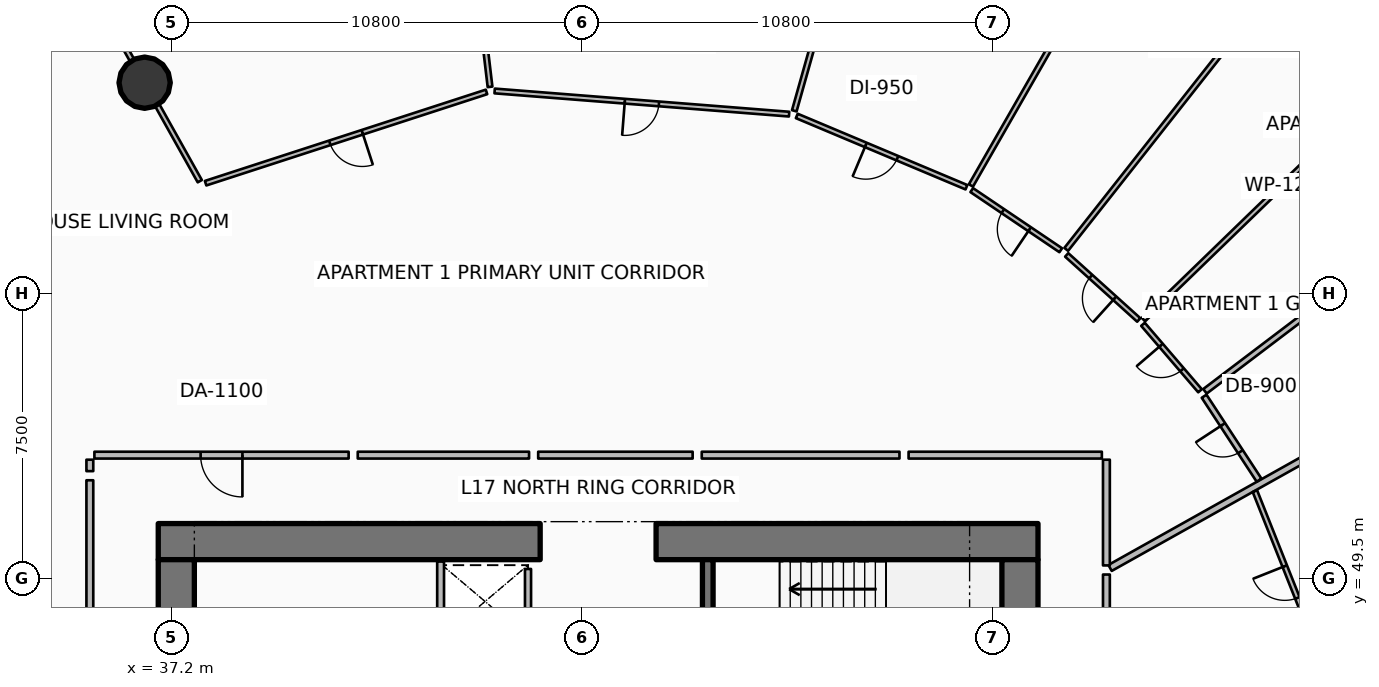
"""IFC4 building model, lengths in metres.
Left out: names, types, materials, properties, quantities, classifications, styles, units other than length and angle.
Written with IfcOpenShell. Run it as: python <this file> out.ifc"""

import sys

from ifc_helpers import new_model, si_unit, direction, frame, frame_2d, origin, origin_2d, place, context, subcontext, project, spatial, rectangle, circle, extrude, element, fill, save


model = new_model("IFC4")
c1 = context("Model", 3, precision=1e-05, world=origin(), true_north=direction((0.0, 1.0)))
c2 = subcontext(c1, "Body", "Model", "MODEL_VIEW")
j1 = project(units=[si_unit("LENGTHUNIT", "METRE"), si_unit("PLANEANGLEUNIT", "RADIAN")], contexts=[c1])
p1 = place(None, origin())
s1 = spatial("IfcSite", under=j1, at=p1, CompositionType="ELEMENT")
p2 = place(p1, origin())
s2 = spatial("IfcBuilding", under=s1, at=p2, CompositionType="ELEMENT")
p3 = place(p2, frame((0.0, 0.0, 71.4)))
s3 = spatial("IfcBuildingStorey", under=s2, at=p3, CompositionType="ELEMENT", Elevation=71.4)
p4 = place(p3, frame((36.85, 50.475, 0.0), z_axis=(0.0, 0.0, 1.0), x_axis=(1.0, 0.0, 0.0)))
e1 = element("IfcWall", 1, at=p4, inside=s3, PredefinedType="SHEAR", context=c2, shape_type="SweptSolid", body=[
    extrude(rectangle(XDim=10.05, YDim=0.95, at=frame_2d((5.025, 0.0))), origin(), (0.0, 0.0, 1.0), 3.75),
])
p5 = place(p3, frame((49.95, 50.475, 0.0), z_axis=(0.0, 0.0, 1.0), x_axis=(1.0, 0.0, 0.0)))
e2 = element("IfcWall", 2, at=p5, inside=s3, PredefinedType="SHEAR", context=c2, shape_type="SweptSolid", body=[
    extrude(rectangle(XDim=10.05, YDim=0.95, at=frame_2d((5.025, 0.0))), origin(), (0.0, 0.0, 1.0), 3.75),
])
for number, where, z_axis, x_axis in (
    (3, (37.325, 34.0, 0.0), (0.0, 0.0, 1.0), (0.0, 1.0, 0.0)),
    (4, (59.525, 34.0, 0.0), (0.0, 0.0, 1.0), (0.0, 1.0, 0.0)),
):
    element("IfcWall", number, at=place(p3, frame(where, z_axis=z_axis, x_axis=x_axis)), inside=s3, PredefinedType="SHEAR", context=c2, shape_type="SweptSolid", body=[
        extrude(rectangle(XDim=16.0, YDim=0.95, at=frame_2d((8.0, 0.0))), origin(), (0.0, 0.0, 1.0), 3.75),
    ])
p6 = place(p3, frame((51.31, 46.5, 0.0), z_axis=(0.0, 0.0, 1.0), x_axis=(0.0, 1.0, 0.0)))
e5 = element("IfcWall", 5, at=p6, inside=s3, PredefinedType="SHEAR", context=c2, shape_type="SweptSolid", body=[
    extrude(rectangle(XDim=3.5, YDim=0.28, at=frame_2d((1.75, 0.0))), origin(), (0.0, 0.0, 1.0), 3.75),
])
p7 = place(p3, frame((65.458, 64.146, 0.0), z_axis=(-0.271840819549, -0.344907860641, 0.898410338595), x_axis=(0.785386244622, -0.619006015123, 0.0)))
e6 = element("IfcColumn", 6, at=p7, inside=s3, PredefinedType="COLUMN", context=c2, shape_type="SweptSolid", body=[
    extrude(circle(Radius=0.675, at=origin_2d()), origin(), (0.0, 0.0, 1.0), 3.729),
])
p8 = place(p3, frame((36.492, 62.55, 0.0), z_axis=(0.184668222307, -0.329730947174, 0.925837539823), x_axis=(0.872484704386, 0.488641423349, 0.0)))
e7 = element("IfcColumn", 7, at=p8, inside=s3, PredefinedType="COLUMN", context=c2, shape_type="SweptSolid", body=[
    extrude(circle(Radius=0.675, at=origin_2d()), origin(), (0.0, 0.0, 1.0), 3.618),
])
p9 = place(p3, frame((46.58, 48.045, 0.0), z_axis=(0.0, 0.0, 1.0), x_axis=(0.0, 1.0, 0.0)))
e8 = element("IfcWall", 8, at=p9, inside=s3, PredefinedType="PARTITIONING", context=c2, shape_type="SweptSolid", body=[
    extrude(rectangle(XDim=1.71, YDim=0.16, at=frame_2d((0.855, 0.0))), origin(), (0.0, 0.0, 1.0), 3.35),
])
p10 = place(p3, frame((44.28, 47.82, 0.0), z_axis=(0.0, 0.0, 1.0), x_axis=(0.0, 1.0, 0.0)))
e9 = element("IfcWall", 9, at=p10, inside=s3, PredefinedType="PARTITIONING", context=c2, shape_type="SweptSolid", body=[
    extrude(rectangle(XDim=2.13, YDim=0.18, at=frame_2d((1.065, 0.0))), origin(), (0.0, 0.0, 1.0), 3.35),
])
p11 = place(p3, frame((61.896, 49.782, 0.0), z_axis=(0.0, 0.0, 1.0), x_axis=(0.872493215695, 0.488626225828, 0.0)))
e10 = element("IfcWall", 10, at=p11, inside=s3, PredefinedType="PARTITIONING", context=c2, shape_type="SweptSolid", body=[
    extrude(rectangle(XDim=15.612, YDim=0.18, at=frame_2d((7.806, 0.0))), origin(), (0.0, 0.0, 1.0), 2.307),
])
p12 = place(p3, frame((41.86, 52.75, 0.0), z_axis=(0.0, 0.0, 1.0), x_axis=(-1.0, 0.0, 0.0)))
e11 = element("IfcWall", 11, at=p12, inside=s3, PredefinedType="PARTITIONING", context=c2, shape_type="SweptSolid", body=[
    extrude(rectangle(XDim=6.69, YDim=0.18, at=frame_2d((3.345, 0.0))), origin(), (0.0, 0.0, 1.0), 2.307),
])
p13 = place(p12, frame((2.795, 0.0, 0.0)))
e12 = element("IfcOpeningElement", 12, at=p13, cuts=e11, PredefinedType="OPENING", context=c2, shape_type="SweptSolid", body=[
    extrude(rectangle(XDim=1.1, YDim=2.1, at=frame_2d((0.55, 1.05))), frame((0.0, 0.1, 0.0), z_axis=(0.0, -1.0, 0.0), x_axis=(1.0, 0.0, 0.0)), (0.0, 0.0, 1.0), 0.2),
])
p14 = place(p3, frame((35.05, 52.63, 0.0), z_axis=(0.0, 0.0, 1.0), x_axis=(0.0, -1.0, 0.0)))
e13 = element("IfcWall", 13, at=p14, inside=s3, PredefinedType="PARTITIONING", context=c2, shape_type="SweptSolid", body=[
    extrude(rectangle(XDim=0.301, YDim=0.18, at=frame_2d((0.15, 0.0))), origin(), (0.0, 0.0, 1.0), 2.307),
])
p15 = place(p3, frame((61.8, 49.848, 0.0), z_axis=(0.0, 0.0, 1.0), x_axis=(0.0, 1.0, 0.0)))
e14 = element("IfcWall", 14, at=p15, inside=s3, PredefinedType="PARTITIONING", context=c2, shape_type="SweptSolid", body=[
    extrude(rectangle(XDim=2.781, YDim=0.18, at=frame_2d((1.391, 0.0))), origin(), (0.0, 0.0, 1.0), 2.307),
])
p16 = place(p3, frame((61.68, 52.75, 0.0), z_axis=(0.0, 0.0, 1.0), x_axis=(-1.0, 0.0, 0.0)))
e15 = element("IfcWall", 15, at=p16, inside=s3, PredefinedType="PARTITIONING", context=c2, shape_type="SweptSolid", body=[
    extrude(rectangle(XDim=5.085, YDim=0.18, at=frame_2d((2.543, 0.0))), origin(), (0.0, 0.0, 1.0), 2.307),
])
p17 = place(p3, frame((65.816, 52.092, 0.0), z_axis=(0.0, 0.0, 1.0), x_axis=(-0.547635625156, 0.836716930664, 0.0)))
e16 = element("IfcWall", 16, at=p17, inside=s3, PredefinedType="PARTITIONING", context=c2, shape_type="SweptSolid", body=[
    extrude(rectangle(XDim=2.639, YDim=0.15, at=frame_2d((1.32, 0.0))), origin(), (0.0, 0.0, 1.0), 2.307),
])
p18 = place(p17, frame((0.895, 0.0, 0.0)))
e17 = element("IfcOpeningElement", 17, at=p18, cuts=e16, PredefinedType="OPENING", context=c2, shape_type="SweptSolid", body=[
    extrude(rectangle(XDim=0.85, YDim=2.06, at=frame_2d((0.425, 1.03))), frame((0.0, 0.085, 0.0), z_axis=(0.0, -1.0, 0.0), x_axis=(1.0, 0.0, 0.0)), (0.0, 0.0, 1.0), 0.17),
])
p19 = place(p3, frame((64.394, 54.43, 0.0), z_axis=(0.0, 0.0, 1.0), x_axis=(0.796855751732, 0.604169604442, 0.0)))
e18 = element("IfcWall", 18, at=p19, inside=s3, PredefinedType="PARTITIONING", context=c2, shape_type="SweptSolid", body=[
    extrude(rectangle(XDim=4.46, YDim=0.15, at=frame_2d((2.23, 0.0))), origin(), (0.0, 0.0, 1.0), 2.79),
])
p20 = place(p3, frame((62.775, 56.316, 0.0), z_axis=(0.0, 0.0, 1.0), x_axis=(0.718182919159, 0.695854363088, 0.0)))
e19 = element("IfcWall", 19, at=p20, inside=s3, PredefinedType="PARTITIONING", context=c2, shape_type="SweptSolid", body=[
    extrude(rectangle(XDim=10.114, YDim=0.125, at=frame_2d((5.057, 0.0))), origin(), (0.0, 0.0, 1.0), 2.325),
])
p21 = place(p3, frame((64.263, 54.444, 0.0), z_axis=(0.0, 0.0, 1.0), x_axis=(-0.651227570151, 0.758882502022, 0.0)))
e20 = element("IfcWall", 20, at=p21, inside=s3, PredefinedType="PARTITIONING", context=c2, shape_type="SweptSolid", body=[
    extrude(rectangle(XDim=2.304, YDim=0.125, at=frame_2d((1.152, 0.0))), origin(), (0.0, 0.0, 1.0), 2.79),
])
p22 = place(p21, frame((0.727, 0.0, 0.0)))
e21 = element("IfcOpeningElement", 21, at=p22, cuts=e20, PredefinedType="OPENING", context=c2, shape_type="SweptSolid", body=[
    extrude(rectangle(XDim=0.85, YDim=2.06, at=frame_2d((0.425, 1.03))), frame((0.0, 0.073, 0.0), z_axis=(0.0, -1.0, 0.0), x_axis=(1.0, 0.0, 0.0)), (0.0, 0.0, 1.0), 0.145),
])
p23 = place(p3, frame((62.651, 56.307, 0.0), z_axis=(0.0, 0.0, 1.0), x_axis=(-0.742266720662, 0.670104555571, 0.0)))
e22 = element("IfcWall", 22, at=p23, inside=s3, PredefinedType="PARTITIONING", context=c2, shape_type="SweptSolid", body=[
    extrude(rectangle(XDim=2.554, YDim=0.125, at=frame_2d((1.277, 0.0))), origin(), (0.0, 0.0, 1.0), 2.307),
])
p24 = place(p23, frame((0.852, 0.0, 0.0)))
e23 = element("IfcOpeningElement", 23, at=p24, cuts=e22, PredefinedType="OPENING", context=c2, shape_type="SweptSolid", body=[
    extrude(rectangle(XDim=0.85, YDim=2.06, at=frame_2d((0.425, 1.03))), frame((0.0, 0.073, 0.0), z_axis=(0.0, -1.0, 0.0), x_axis=(1.0, 0.0, 0.0)), (0.0, 0.0, 1.0), 0.145),
])
p25 = place(p3, frame((56.354, 52.75, 0.0), z_axis=(0.0, 0.0, 1.0), x_axis=(-1.0, 0.0, 0.0)))
e24 = element("IfcWall", 24, at=p25, inside=s3, PredefinedType="PARTITIONING", context=c2, shape_type="SweptSolid", body=[
    extrude(rectangle(XDim=5.203, YDim=0.18, at=frame_2d((2.601, 0.0))), origin(), (0.0, 0.0, 1.0), 2.307),
])
p26 = place(p3, frame((60.743, 58.164, 0.0), z_axis=(0.0, 0.0, 1.0), x_axis=(0.61907620874, 0.785330916093, 0.0)))
e25 = element("IfcWall", 25, at=p26, inside=s3, PredefinedType="PARTITIONING", context=c2, shape_type="SweptSolid", body=[
    extrude(rectangle(XDim=10.091, YDim=0.125, at=frame_2d((5.046, 0.0))), origin(), (0.0, 0.0, 1.0), 2.307),
])
p27 = place(p3, frame((58.235, 59.846, 0.0), z_axis=(0.0, 0.0, 1.0), x_axis=(0.497506673172, 0.867460149027, 0.0)))
e26 = element("IfcWall", 26, at=p27, inside=s3, PredefinedType="PARTITIONING", context=c2, shape_type="SweptSolid", body=[
    extrude(rectangle(XDim=8.435, YDim=0.125, at=frame_2d((4.218, 0.0))), origin(), (0.0, 0.0, 1.0), 2.325),
])
p28 = place(p3, frame((60.598, 58.142, 0.0), z_axis=(0.0, 0.0, 1.0), x_axis=(-0.828618216794, 0.559814121648, 0.0)))
e27 = element("IfcWall", 27, at=p28, inside=s3, PredefinedType="PARTITIONING", context=c2, shape_type="SweptSolid", body=[
    extrude(rectangle(XDim=2.825, YDim=0.125, at=frame_2d((1.413, 0.0))), origin(), (0.0, 0.0, 1.0), 2.307),
])
p29 = place(p28, frame((0.988, 0.0, 0.0)))
e28 = element("IfcOpeningElement", 28, at=p29, cuts=e27, PredefinedType="OPENING", context=c2, shape_type="SweptSolid", body=[
    extrude(rectangle(XDim=0.85, YDim=2.06, at=frame_2d((0.425, 1.03))), frame((0.0, 0.073, 0.0), z_axis=(0.0, -1.0, 0.0), x_axis=(1.0, 0.0, 0.0)), (0.0, 0.0, 1.0), 0.145),
])
p30 = place(p3, frame((58.117, 59.799, 0.0), z_axis=(0.0, 0.0, 1.0), x_axis=(-0.921919817634, 0.387380755657, 0.0)))
e29 = element("IfcWall", 29, at=p30, inside=s3, PredefinedType="PARTITIONING", context=c2, shape_type="SweptSolid", body=[
    extrude(rectangle(XDim=4.843, YDim=0.125, at=frame_2d((2.421, 0.0))), origin(), (0.0, 0.0, 1.0), 2.307),
])
p31 = place(p30, frame((1.971, 0.0, 0.0)))
e30 = element("IfcOpeningElement", 30, at=p31, cuts=e29, PredefinedType="OPENING", context=c2, shape_type="SweptSolid", body=[
    extrude(rectangle(XDim=0.9, YDim=2.08, at=frame_2d((0.45, 1.04))), frame((0.0, 0.073, 0.0), z_axis=(0.0, -1.0, 0.0), x_axis=(1.0, 0.0, 0.0)), (0.0, 0.0, 1.0), 0.145),
])
p32 = place(p3, frame((50.912, 52.75, 0.0), z_axis=(0.0, 0.0, 1.0), x_axis=(-1.0, 0.0, 0.0)))
e31 = element("IfcWall", 31, at=p32, inside=s3, PredefinedType="PARTITIONING", context=c2, shape_type="SweptSolid", body=[
    extrude(rectangle(XDim=4.064, YDim=0.18, at=frame_2d((2.032, 0.0))), origin(), (0.0, 0.0, 1.0), 2.307),
])
p33 = place(p3, frame((53.587, 61.81, 0.0), z_axis=(0.0, 0.0, 1.0), x_axis=(0.271464088879, 0.962448569249, 0.0)))
e32 = element("IfcWall", 32, at=p33, inside=s3, PredefinedType="PARTITIONING", context=c2, shape_type="SweptSolid", body=[
    extrude(rectangle(XDim=7.389, YDim=0.125, at=frame_2d((3.695, 0.0))), origin(), (0.0, 0.0, 1.0), 2.307),
])
p34 = place(p3, frame((53.45, 61.723, 0.0), z_axis=(0.0, 0.0, 1.0), x_axis=(-0.996916540968, 0.078469168116, 0.0)))
e33 = element("IfcWall", 33, at=p34, inside=s3, PredefinedType="PARTITIONING", context=c2, shape_type="SweptSolid", body=[
    extrude(rectangle(XDim=7.772, YDim=0.125, at=frame_2d((3.886, 0.0))), origin(), (0.0, 0.0, 1.0), 2.307),
])
p35 = place(p34, frame((3.436, 0.0, 0.0)))
e34 = element("IfcOpeningElement", 34, at=p35, cuts=e33, PredefinedType="OPENING", context=c2, shape_type="SweptSolid", body=[
    extrude(rectangle(XDim=0.9, YDim=2.08, at=frame_2d((0.45, 1.04))), frame((0.0, 0.073, 0.0), z_axis=(0.0, -1.0, 0.0), x_axis=(1.0, 0.0, 0.0)), (0.0, 0.0, 1.0), 0.145),
])
p36 = place(p3, frame((46.608, 52.75, 0.0), z_axis=(0.0, 0.0, 1.0), x_axis=(-1.0, 0.0, 0.0)))
e35 = element("IfcWall", 35, at=p36, inside=s3, PredefinedType="PARTITIONING", context=c2, shape_type="SweptSolid", body=[
    extrude(rectangle(XDim=4.508, YDim=0.18, at=frame_2d((2.254, 0.0))), origin(), (0.0, 0.0, 1.0), 2.307),
])
p37 = place(p3, frame((45.581, 62.44, 0.0), z_axis=(0.0, 0.0, 1.0), x_axis=(-0.117522242016, 0.993070250602, 0.0)))
e36 = element("IfcWall", 36, at=p37, inside=s3, PredefinedType="PARTITIONING", context=c2, shape_type="SweptSolid", body=[
    extrude(rectangle(XDim=5.013, YDim=0.125, at=frame_2d((2.506, 0.0))), origin(), (0.0, 0.0, 1.0), 2.307),
])
p38 = place(p3, frame((37.943, 59.958, 0.0), z_axis=(0.0, 0.0, 1.0), x_axis=(-0.488606395453, 0.872504321091, 0.0)))
e37 = element("IfcWall", 37, at=p38, inside=s3, PredefinedType="PARTITIONING", context=c2, shape_type="SweptSolid", body=[
    extrude(rectangle(XDim=4.913, YDim=0.125, at=frame_2d((2.457, 0.0))), origin(), (0.0, 0.0, 1.0), 2.307),
])
p39 = place(p3, frame((45.488, 62.307, 0.0), z_axis=(0.0, 0.0, 1.0), x_axis=(-0.951058997127, -0.309009359055, 0.0)))
e38 = element("IfcWall", 38, at=p39, inside=s3, PredefinedType="PARTITIONING", context=c2, shape_type="SweptSolid", body=[
    extrude(rectangle(XDim=7.772, YDim=0.125, at=frame_2d((3.886, 0.0))), origin(), (0.0, 0.0, 1.0), 2.307),
])
p40 = place(p39, frame((3.436, 0.0, 0.0)))
e39 = element("IfcOpeningElement", 39, at=p40, cuts=e38, PredefinedType="OPENING", context=c2, shape_type="SweptSolid", body=[
    extrude(rectangle(XDim=0.9, YDim=2.08, at=frame_2d((0.45, 1.04))), frame((0.0, 0.073, 0.0), z_axis=(0.0, -1.0, 0.0), x_axis=(1.0, 0.0, 0.0)), (0.0, 0.0, 1.0), 0.145),
])
p41 = place(p3, frame((35.05, 52.089, 0.0), z_axis=(0.0, 0.0, 1.0), x_axis=(0.0, -1.0, 0.0)))
e40 = element("IfcWall", 40, at=p41, inside=s3, PredefinedType="PARTITIONING", context=c2, shape_type="SweptSolid", body=[
    extrude(rectangle(XDim=6.317, YDim=0.18, at=frame_2d((3.158, 0.0))), origin(), (0.0, 0.0, 1.0), 2.307),
])
p42 = place(p3, frame((61.8, 43.753, 0.0), z_axis=(0.0, 0.0, 1.0), x_axis=(0.0, 1.0, 0.0)))
e41 = element("IfcWall", 41, at=p42, inside=s3, PredefinedType="PARTITIONING", context=c2, shape_type="SweptSolid", body=[
    extrude(rectangle(XDim=5.855, YDim=0.18, at=frame_2d((2.927, 0.0))), origin(), (0.0, 0.0, 1.0), 2.307),
])
p43 = place(p3, frame((67.611, 47.019, 0.0), z_axis=(0.0, 0.0, 1.0), x_axis=(-0.36955872322, 0.929207377334, 0.0)))
e42 = element("IfcWall", 42, at=p43, inside=s3, PredefinedType="PARTITIONING", context=c2, shape_type="SweptSolid", body=[
    extrude(rectangle(XDim=5.149, YDim=0.125, at=frame_2d((2.574, 0.0))), origin(), (0.0, 0.0, 1.0), 2.307),
])
p44 = place(p43, frame((2.125, 0.0, 0.0)))
e43 = element("IfcOpeningElement", 43, at=p44, cuts=e42, PredefinedType="OPENING", context=c2, shape_type="SweptSolid", body=[
    extrude(rectangle(XDim=0.9, YDim=2.08, at=frame_2d((0.45, 1.04))), frame((0.0, 0.073, 0.0), z_axis=(0.0, -1.0, 0.0), x_axis=(1.0, 0.0, 0.0)), (0.0, 0.0, 1.0), 0.145),
])
p45 = place(p13, origin())
e44 = element("IfcDoor", 44, at=p45, inside=s3, OperationType="SINGLE_SWING_LEFT", PredefinedType="DOOR", context=c2, shape_type="SweptSolid", body=[
    extrude(rectangle(XDim=1.1, YDim=2.1, at=frame_2d((0.55, 1.05))), frame((0.0, 0.025, 0.0), z_axis=(0.0, -1.0, 0.0), x_axis=(1.0, 0.0, 0.0)), (0.0, 0.0, 1.0), 0.05),
])
fill(e12, e44)
p46 = place(p18, origin())
e45 = element("IfcDoor", 45, at=p46, inside=s3, OperationType="SINGLE_SWING_RIGHT", PredefinedType="DOOR", context=c2, shape_type="SweptSolid", body=[
    extrude(rectangle(XDim=0.85, YDim=2.06, at=frame_2d((0.425, 1.03))), frame((0.0, 0.025, 0.0), z_axis=(0.0, -1.0, 0.0), x_axis=(1.0, 0.0, 0.0)), (0.0, 0.0, 1.0), 0.05),
])
fill(e17, e45)
p47 = place(p22, origin())
e46 = element("IfcDoor", 46, at=p47, inside=s3, OperationType="SINGLE_SWING_RIGHT", PredefinedType="DOOR", context=c2, shape_type="SweptSolid", body=[
    extrude(rectangle(XDim=0.85, YDim=2.06, at=frame_2d((0.425, 1.03))), frame((0.0, 0.025, 0.0), z_axis=(0.0, -1.0, 0.0), x_axis=(1.0, 0.0, 0.0)), (0.0, 0.0, 1.0), 0.05),
])
fill(e21, e46)
p48 = place(p24, origin())
e47 = element("IfcDoor", 47, at=p48, inside=s3, OperationType="SINGLE_SWING_LEFT", PredefinedType="DOOR", context=c2, shape_type="SweptSolid", body=[
    extrude(rectangle(XDim=0.85, YDim=2.06, at=frame_2d((0.425, 1.03))), frame((0.0, 0.025, 0.0), z_axis=(0.0, -1.0, 0.0), x_axis=(1.0, 0.0, 0.0)), (0.0, 0.0, 1.0), 0.05),
])
fill(e23, e47)
p49 = place(p29, origin())
e48 = element("IfcDoor", 48, at=p49, inside=s3, OperationType="SINGLE_SWING_LEFT", PredefinedType="DOOR", context=c2, shape_type="SweptSolid", body=[
    extrude(rectangle(XDim=0.85, YDim=2.06, at=frame_2d((0.425, 1.03))), frame((0.0, 0.025, 0.0), z_axis=(0.0, -1.0, 0.0), x_axis=(1.0, 0.0, 0.0)), (0.0, 0.0, 1.0), 0.05),
])
fill(e28, e48)
p50 = place(p31, origin())
e49 = element("IfcDoor", 49, at=p50, inside=s3, OperationType="SINGLE_SWING_RIGHT", PredefinedType="DOOR", context=c2, shape_type="SweptSolid", body=[
    extrude(rectangle(XDim=0.9, YDim=2.08, at=frame_2d((0.45, 1.04))), frame((0.0, 0.025, 0.0), z_axis=(0.0, -1.0, 0.0), x_axis=(1.0, 0.0, 0.0)), (0.0, 0.0, 1.0), 0.05),
])
fill(e30, e49)
p51 = place(p35, origin())
e50 = element("IfcDoor", 50, at=p51, inside=s3, OperationType="SINGLE_SWING_RIGHT", PredefinedType="DOOR", context=c2, shape_type="SweptSolid", body=[
    extrude(rectangle(XDim=0.9, YDim=2.08, at=frame_2d((0.45, 1.04))), frame((0.0, 0.025, 0.0), z_axis=(0.0, -1.0, 0.0), x_axis=(1.0, 0.0, 0.0)), (0.0, 0.0, 1.0), 0.05),
])
fill(e34, e50)
p52 = place(p40, origin())
e51 = element("IfcDoor", 51, at=p52, inside=s3, OperationType="SINGLE_SWING_LEFT", PredefinedType="DOOR", context=c2, shape_type="SweptSolid", body=[
    extrude(rectangle(XDim=0.9, YDim=2.08, at=frame_2d((0.45, 1.04))), frame((0.0, 0.025, 0.0), z_axis=(0.0, -1.0, 0.0), x_axis=(1.0, 0.0, 0.0)), (0.0, 0.0, 1.0), 0.05),
])
fill(e39, e51)
p53 = place(p44, origin())
e52 = element("IfcDoor", 52, at=p53, inside=s3, OperationType="SINGLE_SWING_RIGHT", PredefinedType="DOOR", context=c2, shape_type="SweptSolid", body=[
    extrude(rectangle(XDim=0.9, YDim=2.08, at=frame_2d((0.45, 1.04))), frame((0.0, 0.025, 0.0), z_axis=(0.0, -1.0, 0.0), x_axis=(1.0, 0.0, 0.0)), (0.0, 0.0, 1.0), 0.05),
])
fill(e43, e52)
save(model, sys.argv[1])
